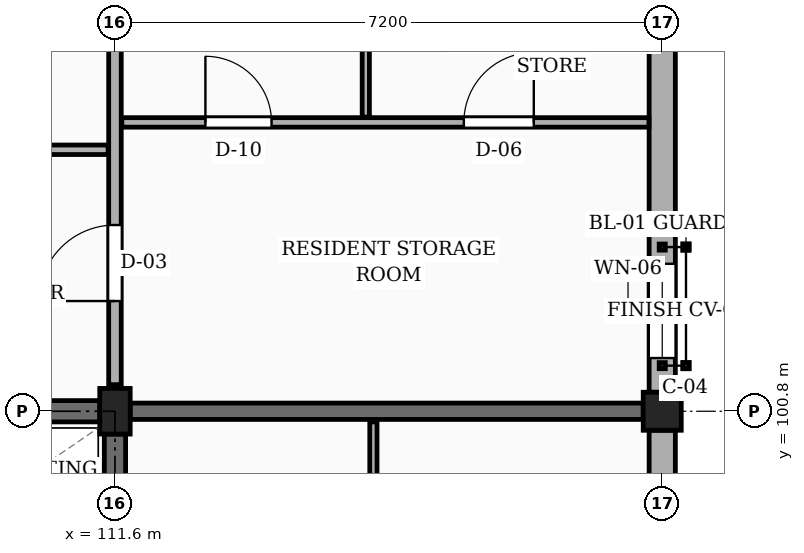
"""IFC4 building model, lengths in metres.
Left out: names, types, materials, properties, quantities, classifications, styles, units other than length and angle.
Written with IfcOpenShell. Run it as: python <this file> out.ifc"""

import sys

from ifc_helpers import new_model, si_unit, direction, frame, frame_2d, origin, origin_2d, place, context, subcontext, project, spatial, rectangle, extrude, element, fill, save


model = new_model("IFC4")
c1 = context("Model", 3, precision=1e-05, world=origin(), true_north=direction((0.0, 1.0)))
c2 = subcontext(c1, "Body", "Model", "MODEL_VIEW")
j1 = project(units=[si_unit("LENGTHUNIT", "METRE"), si_unit("PLANEANGLEUNIT", "RADIAN")], contexts=[c1])
p1 = place(None, origin())
s1 = spatial("IfcSite", under=j1, at=p1, CompositionType="ELEMENT")
p2 = place(p1, origin())
s2 = spatial("IfcBuilding", under=s1, at=p2, CompositionType="ELEMENT")
p3 = place(p2, frame((0.0, 0.0, 26.55)))
s3 = spatial("IfcBuildingStorey", under=s2, at=p3, CompositionType="ELEMENT", Elevation=26.55)
p4 = place(p3, frame((111.6, 100.8, 0.0), z_axis=(0.0, 0.0, 1.0), x_axis=(1.0, 0.0, 0.0)))
e1 = element("IfcColumn", 1, at=p4, inside=s3, PredefinedType="COLUMN", context=c2, shape_type="SweptSolid", body=[
    extrude(rectangle(XDim=0.4, YDim=0.6, at=origin_2d()), origin(), (0.0, 0.0, 1.0), 3.15),
])
p5 = place(p3, frame((118.8, 100.8, 0.0), z_axis=(0.0, 0.0, 1.0), x_axis=(1.0, 0.0, 0.0)))
e2 = element("IfcColumn", 2, at=p5, inside=s3, PredefinedType="COLUMN", context=c2, shape_type="SweptSolid", body=[
    extrude(rectangle(XDim=0.5, YDim=0.5, at=origin_2d()), origin(), (0.0, 0.0, 1.0), 3.15),
])
p6 = place(p3, frame((111.8, 100.8, 0.0), z_axis=(0.0, 0.0, 1.0), x_axis=(1.0, 0.0, 0.0)))
e3 = element("IfcWall", 3, at=p6, inside=s3, PredefinedType="SOLIDWALL", context=c2, shape_type="SweptSolid", body=[
    extrude(rectangle(XDim=6.75, YDim=0.215, at=frame_2d((3.375, 0.0))), origin(), (0.0, 0.0, 1.0), 2.19),
])
p7 = place(p3, frame((118.8, 93.85, 0.0), z_axis=(0.0, 0.0, 1.0), x_axis=(0.0, 1.0, 0.0)))
e4 = element("IfcWall", 4, at=p7, inside=s3, PredefinedType="SOLIDWALL", context=c2, shape_type="SweptSolid", body=[
    extrude(rectangle(XDim=6.7, YDim=0.345, at=frame_2d((3.35, 0.0))), origin(), (0.0, 0.0, 1.0), 2.46),
])
p8 = place(p7, frame((0.45, 0.0, 0.78)))
e5 = element("IfcOpeningElement", 5, at=p8, cuts=e4, PredefinedType="OPENING", context=c2, shape_type="SweptSolid", body=[
    extrude(rectangle(XDim=1.08, YDim=1.15, at=frame_2d((0.54, 0.575))), frame((0.0, 0.183, 0.0), z_axis=(0.0, -1.0, 0.0), x_axis=(1.0, 0.0, 0.0)), (0.0, 0.0, 1.0), 0.365),
])
p9 = place(p7, frame((4.65, 0.0, 0.78)))
e6 = element("IfcOpeningElement", 6, at=p9, cuts=e4, PredefinedType="OPENING", context=c2, shape_type="SweptSolid", body=[
    extrude(rectangle(XDim=1.24, YDim=1.15, at=frame_2d((0.62, 0.575))), frame((0.0, 0.183, 0.0), z_axis=(0.0, -1.0, 0.0), x_axis=(1.0, 0.0, 0.0)), (0.0, 0.0, 1.0), 0.365),
])
p10 = place(p3, frame((118.8, 101.05, 0.0), z_axis=(0.0, 0.0, 1.0), x_axis=(0.0, 1.0, 0.0)))
e7 = element("IfcWall", 7, at=p10, inside=s3, PredefinedType="SOLIDWALL", context=c2, shape_type="SweptSolid", body=[
    extrude(rectangle(XDim=6.7, YDim=0.345, at=frame_2d((3.35, 0.0))), origin(), (0.0, 0.0, 1.0), 2.46),
])
p11 = place(p10, frame((0.45, 0.0, 0.78)))
e8 = element("IfcOpeningElement", 8, at=p11, cuts=e7, PredefinedType="OPENING", context=c2, shape_type="SweptSolid", body=[
    extrude(rectangle(XDim=1.24, YDim=1.15, at=frame_2d((0.62, 0.575))), frame((0.0, 0.183, 0.0), z_axis=(0.0, -1.0, 0.0), x_axis=(1.0, 0.0, 0.0)), (0.0, 0.0, 1.0), 0.365),
])
p12 = place(p10, frame((4.65, 0.0, 0.78)))
e9 = element("IfcOpeningElement", 9, at=p12, cuts=e7, PredefinedType="OPENING", context=c2, shape_type="SweptSolid", body=[
    extrude(rectangle(XDim=1.4, YDim=1.15, at=frame_2d((0.7, 0.575))), frame((0.0, 0.183, 0.0), z_axis=(0.0, -1.0, 0.0), x_axis=(1.0, 0.0, 0.0)), (0.0, 0.0, 1.0), 0.365),
])
p13 = place(p3, frame((104.6, 100.8, 0.0), z_axis=(0.0, 0.0, 1.0), x_axis=(1.0, 0.0, 0.0)))
e10 = element("IfcWall", 10, at=p13, inside=s3, PredefinedType="SHEAR", context=c2, shape_type="SweptSolid", body=[
    extrude(rectangle(XDim=6.8, YDim=0.28, at=frame_2d((3.4, 0.0))), origin(), (0.0, 0.0, 1.0), 2.89),
])
p14 = place(p3, frame((111.6, 93.9, 0.0), z_axis=(0.0, 0.0, 1.0), x_axis=(0.0, 1.0, 0.0)))
e11 = element("IfcWall", 11, at=p14, inside=s3, PredefinedType="SHEAR", context=c2, shape_type="SweptSolid", body=[
    extrude(rectangle(XDim=6.6, YDim=0.28, at=frame_2d((3.3, 0.0))), origin(), (0.0, 0.0, 1.0), 2.89),
])
p15 = place(p3, frame((111.6, 101.15, 0.0), z_axis=(0.0, 0.0, 1.0), x_axis=(0.0, 1.0, 0.0)))
e12 = element("IfcWall", 12, at=p15, inside=s3, PredefinedType="PARTITIONING", context=c2, shape_type="SweptSolid", body=[
    extrude(rectangle(XDim=6.5, YDim=0.165, at=frame_2d((3.25, 0.0))), origin(), (0.0, 0.0, 1.0), 2.325),
])
p16 = place(p15, frame((1.1, 0.0, 0.0)))
e13 = element("IfcOpeningElement", 13, at=p16, cuts=e12, PredefinedType="OPENING", context=c2, shape_type="SweptSolid", body=[
    extrude(rectangle(XDim=1.0, YDim=2.15, at=frame_2d((0.5, 1.075))), frame((0.0, 0.093, 0.0), z_axis=(0.0, -1.0, 0.0), x_axis=(1.0, 0.0, 0.0)), (0.0, 0.0, 1.0), 0.185),
])
p17 = place(p3, frame((115.0, 96.97, 0.0), z_axis=(0.0, 0.0, 1.0), x_axis=(0.0, 1.0, 0.0)))
e14 = element("IfcWall", 14, at=p17, inside=s3, PredefinedType="PARTITIONING", context=c2, shape_type="SweptSolid", body=[
    extrude(rectangle(XDim=3.69, YDim=0.095, at=frame_2d((1.845, 0.0))), origin(), (0.0, 0.0, 1.0), 2.325),
])
p18 = place(p3, frame((104.49, 104.24, 0.0), z_axis=(0.0, 0.0, 1.0), x_axis=(1.0, 0.0, 0.0)))
e15 = element("IfcWall", 15, at=p18, inside=s3, PredefinedType="PARTITIONING", context=c2, shape_type="SweptSolid", body=[
    extrude(rectangle(XDim=7.02, YDim=0.125, at=frame_2d((3.51, 0.0))), origin(), (0.0, 0.0, 1.0), 2.325),
])
p19 = place(p18, frame((2.85, 0.0, 0.0)))
e16 = element("IfcOpeningElement", 16, at=p19, cuts=e15, PredefinedType="OPENING", context=c2, shape_type="SweptSolid", body=[
    extrude(rectangle(XDim=1.02, YDim=2.15, at=frame_2d((0.51, 1.075))), frame((0.0, 0.073, 0.0), z_axis=(0.0, -1.0, 0.0), x_axis=(1.0, 0.0, 0.0)), (0.0, 0.0, 1.0), 0.145),
])
p20 = place(p3, frame((111.69, 104.6, 0.0), z_axis=(0.0, 0.0, 1.0), x_axis=(1.0, 0.0, 0.0)))
e17 = element("IfcWall", 17, at=p20, inside=s3, PredefinedType="PARTITIONING", context=c2, shape_type="SweptSolid", body=[
    extrude(rectangle(XDim=6.935, YDim=0.125, at=frame_2d((3.468, 0.0))), origin(), (0.0, 0.0, 1.0), 2.325),
])
p21 = place(p20, frame((1.1, 0.0, 0.0)))
e18 = element("IfcOpeningElement", 18, at=p21, cuts=e17, PredefinedType="OPENING", context=c2, shape_type="SweptSolid", body=[
    extrude(rectangle(XDim=0.87, YDim=2.05, at=frame_2d((0.435, 1.025))), frame((0.0, 0.073, 0.0), z_axis=(0.0, -1.0, 0.0), x_axis=(1.0, 0.0, 0.0)), (0.0, 0.0, 1.0), 0.145),
])
p22 = place(p20, frame((4.5, 0.0, 0.0)))
e19 = element("IfcOpeningElement", 19, at=p22, cuts=e17, PredefinedType="OPENING", context=c2, shape_type="SweptSolid", body=[
    extrude(rectangle(XDim=0.92, YDim=2.1, at=frame_2d((0.46, 1.05))), frame((0.0, 0.073, 0.0), z_axis=(0.0, -1.0, 0.0), x_axis=(1.0, 0.0, 0.0)), (0.0, 0.0, 1.0), 0.145),
])
p23 = place(p3, frame((114.9, 104.67, 0.0), z_axis=(0.0, 0.0, 1.0), x_axis=(0.0, 1.0, 0.0)))
e20 = element("IfcWall", 20, at=p23, inside=s3, PredefinedType="PARTITIONING", context=c2, shape_type="SweptSolid", body=[
    extrude(rectangle(XDim=3.19, YDim=0.095, at=frame_2d((1.595, 0.0))), origin(), (0.0, 0.0, 1.0), 2.325),
])
p24 = place(p11, origin())
e21 = element("IfcWindow", 21, at=p24, inside=s3, PartitioningType="SINGLE_PANEL", PredefinedType="WINDOW", context=c2, shape_type="SweptSolid", body=[
    extrude(rectangle(XDim=1.24, YDim=1.15, at=frame_2d((0.62, 0.575))), frame((0.0, 0.03, 0.0), z_axis=(0.0, -1.0, 0.0), x_axis=(1.0, 0.0, 0.0)), (0.0, 0.0, 1.0), 0.06),
])
fill(e8, e21)
p25 = place(p16, origin())
e22 = element("IfcDoor", 22, at=p25, inside=s3, OperationType="SINGLE_SWING_LEFT", PredefinedType="DOOR", context=c2, shape_type="SweptSolid", body=[
    extrude(rectangle(XDim=1.0, YDim=2.15, at=frame_2d((0.5, 1.075))), frame((0.0, 0.025, 0.0), z_axis=(0.0, -1.0, 0.0), x_axis=(1.0, 0.0, 0.0)), (0.0, 0.0, 1.0), 0.05),
])
fill(e13, e22)
p26 = place(p21, origin())
e23 = element("IfcDoor", 23, at=p26, inside=s3, OperationType="SINGLE_SWING_LEFT", PredefinedType="DOOR", context=c2, shape_type="SweptSolid", body=[
    extrude(rectangle(XDim=0.87, YDim=2.05, at=frame_2d((0.435, 1.025))), frame((0.0, 0.025, 0.0), z_axis=(0.0, -1.0, 0.0), x_axis=(1.0, 0.0, 0.0)), (0.0, 0.0, 1.0), 0.05),
])
fill(e18, e23)
p27 = place(p22, origin())
e24 = element("IfcDoor", 24, at=p27, inside=s3, OperationType="SINGLE_SWING_RIGHT", PredefinedType="DOOR", context=c2, shape_type="SweptSolid", body=[
    extrude(rectangle(XDim=0.92, YDim=2.1, at=frame_2d((0.46, 1.05))), frame((0.0, 0.025, 0.0), z_axis=(0.0, -1.0, 0.0), x_axis=(1.0, 0.0, 0.0)), (0.0, 0.0, 1.0), 0.05),
])
fill(e19, e24)
save(model, sys.argv[1])
